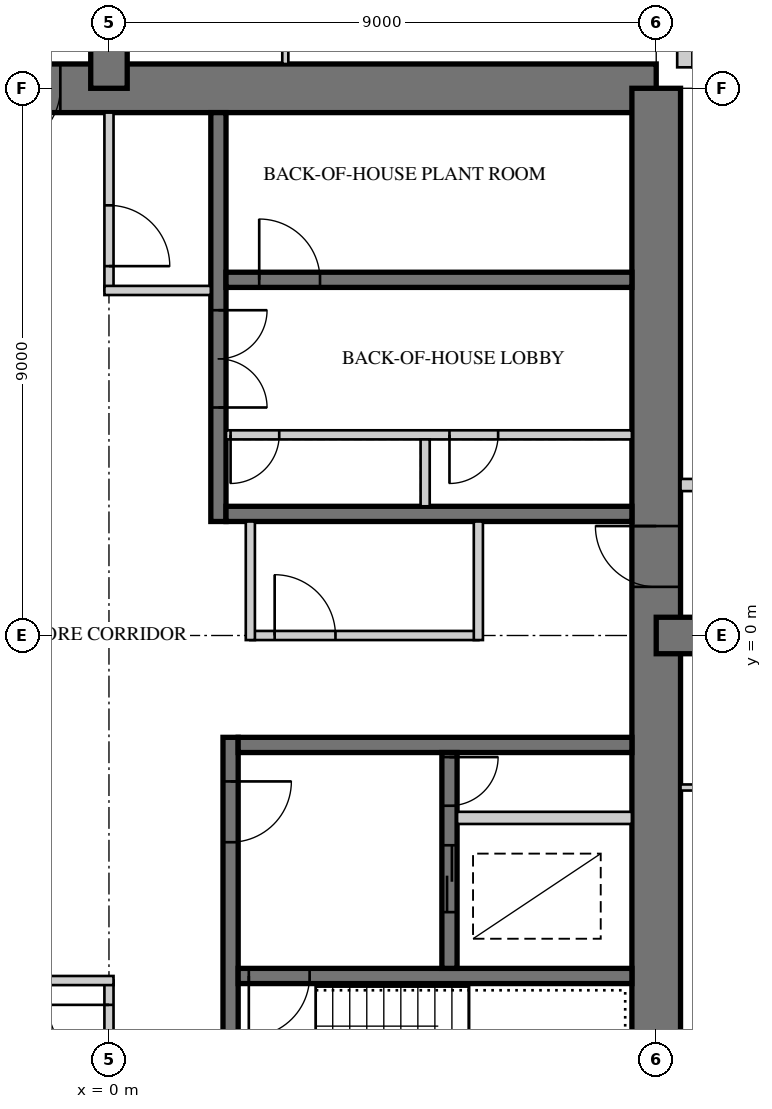
"""IFC4 building model, lengths in metres.
Left out: names, types, materials, properties, quantities, classifications, styles, units other than length and angle.
Written with IfcOpenShell. Run it as: python <this file> out.ifc"""

import sys

from ifc_helpers import new_model, si_unit, direction, frame, frame_2d, origin, place, context, subcontext, project, spatial, rectangle, extrude, element, fill, save


model = new_model("IFC4")
c1 = context("Model", 3, precision=1e-05, world=origin(), true_north=direction((0.0, 1.0)))
c2 = subcontext(c1, "Body", "Model", "MODEL_VIEW")
j1 = project(units=[si_unit("LENGTHUNIT", "METRE"), si_unit("PLANEANGLEUNIT", "RADIAN")], contexts=[c1])
p1 = place(None, origin())
s1 = spatial("IfcSite", under=j1, at=p1, CompositionType="ELEMENT")
p2 = place(p1, origin())
s2 = spatial("IfcBuilding", under=s1, at=p2, CompositionType="ELEMENT")
p3 = place(p2, frame((0.0, 0.0, 267.9)))
s3 = spatial("IfcBuildingStorey", under=s2, at=p3, CompositionType="ELEMENT", Elevation=267.9)
p4 = place(p3, frame((9.0, 9.0, 0.0), z_axis=(0.0, 0.0, 1.0), x_axis=(-1.0, 0.0, 0.0)))
e1 = element("IfcWall", 1, at=p4, inside=s3, PredefinedType="SHEAR", context=c2, shape_type="SweptSolid", body=[
    extrude(rectangle(XDim=18.0, YDim=0.8, at=frame_2d((9.0, 0.0))), origin(), (0.0, 0.0, 1.0), 3.4),
])
p5 = place(p4, frame((9.8, 0.0, 0.0)))
e2 = element("IfcOpeningElement", 2, at=p5, cuts=e1, PredefinedType="OPENING", context=c2, shape_type="SweptSolid", body=[
    extrude(rectangle(XDim=1.0, YDim=2.4, at=frame_2d((0.5, 1.2))), frame((0.0, 0.41, 0.0), z_axis=(0.0, -1.0, 0.0), x_axis=(1.0, 0.0, 0.0)), (0.0, 0.0, 1.0), 0.82),
])
p6 = place(p3, frame((9.0, -9.0, 0.0), z_axis=(0.0, 0.0, 1.0), x_axis=(0.0, 1.0, 0.0)))
e3 = element("IfcWall", 3, at=p6, inside=s3, PredefinedType="SHEAR", context=c2, shape_type="SweptSolid", body=[
    extrude(rectangle(XDim=18.0, YDim=0.8, at=frame_2d((9.0, 0.0))), origin(), (0.0, 0.0, 1.0), 3.4),
])
p7 = place(p6, frame((9.8, 0.0, 0.0)))
e4 = element("IfcOpeningElement", 4, at=p7, cuts=e3, PredefinedType="OPENING", context=c2, shape_type="SweptSolid", body=[
    extrude(rectangle(XDim=1.0, YDim=2.4, at=frame_2d((0.5, 1.2))), frame((0.0, 0.41, 0.0), z_axis=(0.0, -1.0, 0.0), x_axis=(1.0, 0.0, 0.0)), (0.0, 0.0, 1.0), 0.82),
])
p8 = place(p3, frame((1.8, 1.875, 0.0), z_axis=(0.0, 0.0, 1.0), x_axis=(0.0, 1.0, 0.0)))
e5 = element("IfcWall", 5, at=p8, inside=s3, PredefinedType="SHEAR", context=c2, shape_type="SweptSolid", body=[
    extrude(rectangle(XDim=6.725, YDim=0.25, at=frame_2d((3.363, 0.0))), origin(), (0.0, 0.0, 1.0), 3.4),
])
p9 = place(p8, frame((1.875, 0.0, 0.0)))
e6 = element("IfcOpeningElement", 6, at=p9, cuts=e5, PredefinedType="OPENING", context=c2, shape_type="SweptSolid", body=[
    extrude(rectangle(XDim=1.6, YDim=2.4, at=frame_2d((0.8, 1.2))), frame((0.0, 0.135, 0.0), z_axis=(0.0, -1.0, 0.0), x_axis=(1.0, 0.0, 0.0)), (0.0, 0.0, 1.0), 0.27),
])
p10 = place(p3, frame((1.925, 2.0, 0.0), z_axis=(0.0, 0.0, 1.0), x_axis=(1.0, 0.0, 0.0)))
e7 = element("IfcWall", 7, at=p10, inside=s3, PredefinedType="SHEAR", context=c2, shape_type="SweptSolid", body=[
    extrude(rectangle(XDim=6.675, YDim=0.25, at=frame_2d((3.337, 0.0))), origin(), (0.0, 0.0, 1.0), 3.4),
])
p11 = place(p3, frame((1.925, 5.85, 0.0), z_axis=(0.0, 0.0, 1.0), x_axis=(1.0, 0.0, 0.0)))
e8 = element("IfcWall", 8, at=p11, inside=s3, PredefinedType="SHEAR", context=c2, shape_type="SweptSolid", body=[
    extrude(rectangle(XDim=6.675, YDim=0.25, at=frame_2d((3.337, 0.0))), origin(), (0.0, 0.0, 1.0), 3.4),
])
p12 = place(p11, frame((0.546, 0.0, 0.0)))
e9 = element("IfcOpeningElement", 9, at=p12, cuts=e8, PredefinedType="OPENING", context=c2, shape_type="SweptSolid", body=[
    extrude(rectangle(XDim=1.0, YDim=2.1, at=frame_2d((0.5, 1.05))), frame((0.0, 0.135, 0.0), z_axis=(0.0, -1.0, 0.0), x_axis=(1.0, 0.0, 0.0)), (0.0, 0.0, 1.0), 0.27),
])
p13 = place(p3, frame((1.925, 3.3, 0.0), z_axis=(0.0, 0.0, 1.0), x_axis=(1.0, 0.0, 0.0)))
e10 = element("IfcWall", 10, at=p13, inside=s3, PredefinedType="PARTITIONING", context=c2, shape_type="SweptSolid", body=[
    extrude(rectangle(XDim=6.675, YDim=0.15, at=frame_2d((3.337, 0.0))), origin(), (0.0, 0.0, 1.0), 3.4),
])
p14 = place(p13, frame((0.075, 0.0, 0.0)))
e11 = element("IfcOpeningElement", 11, at=p14, cuts=e10, PredefinedType="OPENING", context=c2, shape_type="SweptSolid", body=[
    extrude(rectangle(XDim=0.8, YDim=2.1, at=frame_2d((0.4, 1.05))), frame((0.0, 0.085, 0.0), z_axis=(0.0, -1.0, 0.0), x_axis=(1.0, 0.0, 0.0)), (0.0, 0.0, 1.0), 0.17),
])
p15 = place(p13, frame((3.675, 0.0, 0.0)))
e12 = element("IfcOpeningElement", 12, at=p15, cuts=e10, PredefinedType="OPENING", context=c2, shape_type="SweptSolid", body=[
    extrude(rectangle(XDim=0.8, YDim=2.1, at=frame_2d((0.4, 1.05))), frame((0.0, 0.085, 0.0), z_axis=(0.0, -1.0, 0.0), x_axis=(1.0, 0.0, 0.0)), (0.0, 0.0, 1.0), 0.17),
])
p16 = place(p3, frame((5.2, 2.125, 0.0), z_axis=(0.0, 0.0, 1.0), x_axis=(0.0, 1.0, 0.0)))
e13 = element("IfcWall", 13, at=p16, inside=s3, PredefinedType="PARTITIONING", context=c2, shape_type="SweptSolid", body=[
    extrude(rectangle(XDim=1.1, YDim=0.15, at=frame_2d((0.55, 0.0))), origin(), (0.0, 0.0, 1.0), 3.4),
])
p17 = place(p3, frame((2.0, -1.675, 0.0), z_axis=(0.0, 0.0, 1.0), x_axis=(0.0, -1.0, 0.0)))
e14 = element("IfcWall", 14, at=p17, inside=s3, PredefinedType="SHEAR", context=c2, shape_type="SweptSolid", body=[
    extrude(rectangle(XDim=6.925, YDim=0.25, at=frame_2d((3.462, 0.0))), origin(), (0.0, 0.0, 1.0), 3.4),
])
p18 = place(p17, frame((0.725, 0.0, 0.0)))
e15 = element("IfcOpeningElement", 15, at=p18, cuts=e14, PredefinedType="OPENING", context=c2, shape_type="SweptSolid", body=[
    extrude(rectangle(XDim=1.0, YDim=2.1, at=frame_2d((0.5, 1.05))), frame((0.0, 0.135, 0.0), z_axis=(0.0, -1.0, 0.0), x_axis=(1.0, 0.0, 0.0)), (0.0, 0.0, 1.0), 0.27),
])
p19 = place(p3, frame((2.125, -1.8, 0.0), z_axis=(0.0, 0.0, 1.0), x_axis=(1.0, 0.0, 0.0)))
e16 = element("IfcWall", 16, at=p19, inside=s3, PredefinedType="SHEAR", context=c2, shape_type="SweptSolid", body=[
    extrude(rectangle(XDim=6.475, YDim=0.25, at=frame_2d((3.238, 0.0))), origin(), (0.0, 0.0, 1.0), 3.4),
])
p20 = place(p3, frame((2.125, -5.6, 0.0), z_axis=(0.0, 0.0, 1.0), x_axis=(1.0, 0.0, 0.0)))
e17 = element("IfcWall", 17, at=p20, inside=s3, PredefinedType="SHEAR", context=c2, shape_type="SweptSolid", body=[
    extrude(rectangle(XDim=6.475, YDim=0.25, at=frame_2d((3.238, 0.0))), origin(), (0.0, 0.0, 1.0), 3.4),
])
p21 = place(p20, frame((0.175, 0.0, 0.0)))
e18 = element("IfcOpeningElement", 18, at=p21, cuts=e17, PredefinedType="OPENING", context=c2, shape_type="SweptSolid", body=[
    extrude(rectangle(XDim=1.0, YDim=2.1, at=frame_2d((0.5, 1.05))), frame((0.0, 0.135, 0.0), z_axis=(0.0, -1.0, 0.0), x_axis=(1.0, 0.0, 0.0)), (0.0, 0.0, 1.0), 0.27),
])
p22 = place(p3, frame((5.6, -1.925, 0.0), z_axis=(0.0, 0.0, 1.0), x_axis=(0.0, -1.0, 0.0)))
e19 = element("IfcWall", 19, at=p22, inside=s3, PredefinedType="SHEAR", context=c2, shape_type="SweptSolid", body=[
    extrude(rectangle(XDim=3.55, YDim=0.25, at=frame_2d((1.775, 0.0))), origin(), (0.0, 0.0, 1.0), 3.4),
])
p23 = place(p22, frame((1.525, 0.0, 0.0)))
e20 = element("IfcOpeningElement", 20, at=p23, cuts=e19, PredefinedType="OPENING", context=c2, shape_type="SweptSolid", body=[
    extrude(rectangle(XDim=1.1, YDim=2.2, at=frame_2d((0.55, 1.1))), frame((0.0, 0.135, 0.0), z_axis=(0.0, -1.0, 0.0), x_axis=(1.0, 0.0, 0.0)), (0.0, 0.0, 1.0), 0.27),
])
p24 = place(p22, frame((0.075, 0.0, 0.0)))
e21 = element("IfcOpeningElement", 21, at=p24, cuts=e19, PredefinedType="OPENING", context=c2, shape_type="SweptSolid", body=[
    extrude(rectangle(XDim=0.8, YDim=2.1, at=frame_2d((0.4, 1.05))), frame((0.0, 0.135, 0.0), z_axis=(0.0, -1.0, 0.0), x_axis=(1.0, 0.0, 0.0)), (0.0, 0.0, 1.0), 0.27),
])
p25 = place(p3, frame((5.725, -3.0, 0.0), z_axis=(0.0, 0.0, 1.0), x_axis=(1.0, 0.0, 0.0)))
e22 = element("IfcWall", 22, at=p25, inside=s3, PredefinedType="PARTITIONING", context=c2, shape_type="SweptSolid", body=[
    extrude(rectangle(XDim=2.875, YDim=0.2, at=frame_2d((1.438, 0.0))), origin(), (0.0, 0.0, 1.0), 3.4),
])
p26 = place(p3, frame((0.0, 9.0, 0.0), z_axis=(0.0, 0.0, 1.0), x_axis=(0.0, 1.0, 0.0)))
e23 = element("IfcWall", 23, at=p26, inside=s3, PredefinedType="SHEAR", context=c2, shape_type="SweptSolid", body=[
    extrude(rectangle(XDim=9.0, YDim=0.6, at=frame_2d((4.5, 0.0))), origin(), (0.0, 0.0, 1.0), 3.4),
])
p27 = place(p26, frame((3.8, 0.0, 0.0)))
e24 = element("IfcOpeningElement", 24, at=p27, cuts=e23, PredefinedType="OPENING", context=c2, shape_type="SweptSolid", body=[
    extrude(rectangle(XDim=1.0, YDim=2.15, at=frame_2d((0.5, 1.075))), frame((0.0, 0.31, 0.0), z_axis=(0.0, -1.0, 0.0), x_axis=(1.0, 0.0, 0.0)), (0.0, 0.0, 1.0), 0.62),
])
p28 = place(p26, frame((7.0, 0.0, 0.0)))
e25 = element("IfcOpeningElement", 25, at=p28, cuts=e23, PredefinedType="OPENING", context=c2, shape_type="SweptSolid", body=[
    extrude(rectangle(XDim=1.0, YDim=2.2, at=frame_2d((0.5, 1.1))), frame((0.0, 0.31, 0.0), z_axis=(0.0, -1.0, 0.0), x_axis=(1.0, 0.0, 0.0)), (0.0, 0.0, 1.0), 0.62),
])
p29 = place(p3, frame((9.0, 0.0, 0.0), z_axis=(0.0, 0.0, 1.0), x_axis=(1.0, 0.0, 0.0)))
e26 = element("IfcWall", 26, at=p29, inside=s3, PredefinedType="SHEAR", context=c2, shape_type="SweptSolid", body=[
    extrude(rectangle(XDim=9.0, YDim=0.6, at=frame_2d((4.5, 0.0))), origin(), (0.0, 0.0, 1.0), 3.4),
])
p30 = place(p29, frame((3.8, 0.0, 0.0)))
e27 = element("IfcOpeningElement", 27, at=p30, cuts=e26, PredefinedType="OPENING", context=c2, shape_type="SweptSolid", body=[
    extrude(rectangle(XDim=1.0, YDim=2.15, at=frame_2d((0.5, 1.075))), frame((0.0, 0.31, 0.0), z_axis=(0.0, -1.0, 0.0), x_axis=(1.0, 0.0, 0.0)), (0.0, 0.0, 1.0), 0.62),
])
p31 = place(p29, frame((7.0, 0.0, 0.0)))
e28 = element("IfcOpeningElement", 28, at=p31, cuts=e26, PredefinedType="OPENING", context=c2, shape_type="SweptSolid", body=[
    extrude(rectangle(XDim=1.0, YDim=2.2, at=frame_2d((0.5, 1.1))), frame((0.0, 0.31, 0.0), z_axis=(0.0, -1.0, 0.0), x_axis=(1.0, 0.0, 0.0)), (0.0, 0.0, 1.0), 0.62),
])
p32 = place(p3, frame((12.47, 9.47, 0.0), z_axis=(0.0, 0.0, 1.0), x_axis=(-1.0, 0.0, 0.0)))
e29 = element("IfcWall", 29, at=p32, inside=s3, PredefinedType="SOLIDWALL", context=c2, shape_type="SweptSolid", body=[
    extrude(rectangle(XDim=2.875, YDim=0.25, at=frame_2d((1.438, 0.0))), origin(), (0.0, 0.0, 1.0), 3.22),
])
p33 = place(p32, frame((0.6, 0.0, 0.0)))
e30 = element("IfcOpeningElement", 30, at=p33, cuts=e29, PredefinedType="OPENING", context=c2, shape_type="SweptSolid", body=[
    extrude(rectangle(XDim=1.0, YDim=2.2, at=frame_2d((0.5, 1.1))), frame((0.0, 0.135, 0.0), z_axis=(0.0, -1.0, 0.0), x_axis=(1.0, 0.0, 0.0)), (0.0, 0.0, 1.0), 0.27),
])
p34 = place(p3, frame((9.47, 9.345, 0.0), z_axis=(0.0, 0.0, 1.0), x_axis=(0.0, 1.0, 0.0)))
e31 = element("IfcWall", 31, at=p34, inside=s3, PredefinedType="SOLIDWALL", context=c2, shape_type="SweptSolid", body=[
    extrude(rectangle(XDim=3.125, YDim=0.25, at=frame_2d((1.562, 0.0))), origin(), (0.0, 0.0, 1.0), 3.22),
])
p35 = place(p34, frame((0.6, 0.0, 0.0)))
e32 = element("IfcOpeningElement", 32, at=p35, cuts=e31, PredefinedType="OPENING", context=c2, shape_type="SweptSolid", body=[
    extrude(rectangle(XDim=1.0, YDim=2.2, at=frame_2d((0.5, 1.1))), frame((0.0, 0.135, 0.0), z_axis=(0.0, -1.0, 0.0), x_axis=(1.0, 0.0, 0.0)), (0.0, 0.0, 1.0), 0.27),
])
p36 = place(p3, frame((2.325, 0.0, 0.0), z_axis=(0.0, 0.0, 1.0), x_axis=(1.0, 0.0, 0.0)))
e33 = element("IfcWall", 33, at=p36, inside=s3, PredefinedType="PARTITIONING", context=c2, shape_type="SweptSolid", body=[
    extrude(rectangle(XDim=3.75, YDim=0.15, at=frame_2d((1.875, 0.0))), origin(), (0.0, 0.0, 1.0), 3.22),
])
p37 = place(p36, frame((0.4, 0.0, 0.0)))
e34 = element("IfcOpeningElement", 34, at=p37, cuts=e33, PredefinedType="OPENING", context=c2, shape_type="SweptSolid", body=[
    extrude(rectangle(XDim=1.0, YDim=2.1, at=frame_2d((0.5, 1.05))), frame((0.0, 0.085, 0.0), z_axis=(0.0, -1.0, 0.0), x_axis=(1.0, 0.0, 0.0)), (0.0, 0.0, 1.0), 0.17),
])
for number, where, z_axis, x_axis in (
    (35, (2.325, 1.875, 0.0), (0.0, 0.0, 1.0), (0.0, -1.0, 0.0)),
    (36, (6.075, -0.075, 0.0), (0.0, 0.0, 1.0), (0.0, 1.0, 0.0)),
):
    element("IfcWall", number, at=place(p3, frame(where, z_axis=z_axis, x_axis=x_axis)), inside=s3, PredefinedType="PARTITIONING", context=c2, shape_type="SweptSolid", body=[
        extrude(rectangle(XDim=1.95, YDim=0.15, at=frame_2d((0.975, 0.0))), origin(), (0.0, 0.0, 1.0), 3.22),
    ])
p38 = place(p3, frame((0.0, 5.675, 0.0), z_axis=(0.0, 0.0, 1.0), x_axis=(0.0, 1.0, 0.0)))
e37 = element("IfcWall", 37, at=p38, inside=s3, PredefinedType="PARTITIONING", context=c2, shape_type="SweptSolid", body=[
    extrude(rectangle(XDim=2.925, YDim=0.15, at=frame_2d((1.462, 0.0))), origin(), (0.0, 0.0, 1.0), 3.22),
])
p39 = place(p38, frame((0.4, 0.0, 0.0)))
e38 = element("IfcOpeningElement", 38, at=p39, cuts=e37, PredefinedType="OPENING", context=c2, shape_type="SweptSolid", body=[
    extrude(rectangle(XDim=1.0, YDim=2.1, at=frame_2d((0.5, 1.05))), frame((0.0, 0.085, 0.0), z_axis=(0.0, -1.0, 0.0), x_axis=(1.0, 0.0, 0.0)), (0.0, 0.0, 1.0), 0.17),
])
p40 = place(p3, frame((1.675, 5.675, 0.0), z_axis=(0.0, 0.0, 1.0), x_axis=(-1.0, 0.0, 0.0)))
e39 = element("IfcWall", 39, at=p40, inside=s3, PredefinedType="PARTITIONING", context=c2, shape_type="SweptSolid", body=[
    extrude(rectangle(XDim=1.75, YDim=0.15, at=frame_2d((0.875, 0.0))), origin(), (0.0, 0.0, 1.0), 3.22),
])
p41 = place(p3, frame((0.0, -5.675, 0.0), z_axis=(0.0, 0.0, 1.0), x_axis=(0.0, -1.0, 0.0)))
e40 = element("IfcWall", 40, at=p41, inside=s3, PredefinedType="PARTITIONING", context=c2, shape_type="SweptSolid", body=[
    extrude(rectangle(XDim=2.925, YDim=0.15, at=frame_2d((1.462, 0.0))), origin(), (0.0, 0.0, 1.0), 3.22),
])
p42 = place(p41, frame((0.4, 0.0, 0.0)))
e41 = element("IfcOpeningElement", 41, at=p42, cuts=e40, PredefinedType="OPENING", context=c2, shape_type="SweptSolid", body=[
    extrude(rectangle(XDim=1.0, YDim=2.1, at=frame_2d((0.5, 1.05))), frame((0.0, 0.085, 0.0), z_axis=(0.0, -1.0, 0.0), x_axis=(1.0, 0.0, 0.0)), (0.0, 0.0, 1.0), 0.17),
])
p43 = place(p3, frame((-1.675, -5.675, 0.0), z_axis=(0.0, 0.0, 1.0), x_axis=(1.0, 0.0, 0.0)))
e42 = element("IfcWall", 42, at=p43, inside=s3, PredefinedType="PARTITIONING", context=c2, shape_type="SweptSolid", body=[
    extrude(rectangle(XDim=1.75, YDim=0.15, at=frame_2d((0.875, 0.0))), origin(), (0.0, 0.0, 1.0), 3.22),
])
p44 = place(p3, frame((2.9, 9.4, 0.0), z_axis=(0.0, 0.0, 1.0), x_axis=(0.0, 1.0, 0.0)))
e43 = element("IfcWall", 43, at=p44, inside=s3, PredefinedType="PARTITIONING", context=c2, shape_type="SweptSolid", body=[
    extrude(rectangle(XDim=2.85, YDim=0.1, at=frame_2d((1.425, 0.0))), origin(), (0.0, 0.0, 1.0), 3.22),
])
p45 = place(p3, frame((9.4, -2.5, 0.0), z_axis=(0.0, 0.0, 1.0), x_axis=(1.0, 0.0, 0.0)))
e44 = element("IfcWall", 44, at=p45, inside=s3, PredefinedType="PARTITIONING", context=c2, shape_type="SweptSolid", body=[
    extrude(rectangle(XDim=2.65, YDim=0.1, at=frame_2d((1.325, 0.0))), origin(), (0.0, 0.0, 1.0), 3.22),
])
p46 = place(p3, frame((9.4, 2.475, 0.0), z_axis=(0.0, 0.0, 1.0), x_axis=(1.0, 0.0, 0.0)))
e45 = element("IfcWall", 45, at=p46, inside=s3, PredefinedType="SOLIDWALL", context=c2, shape_type="SweptSolid", body=[
    extrude(rectangle(XDim=5.6, YDim=0.2, at=frame_2d((2.8, 0.0))), origin(), (0.0, 0.0, 1.0), 3.22),
])
p47 = place(p46, frame((1.2, 0.0, 0.0)))
e46 = element("IfcOpeningElement", 46, at=p47, cuts=e45, PredefinedType="OPENING", context=c2, shape_type="SweptSolid", body=[
    extrude(rectangle(XDim=1.0, YDim=2.2, at=frame_2d((0.5, 1.1))), frame((0.0, 0.11, 0.0), z_axis=(0.0, -1.0, 0.0), x_axis=(1.0, 0.0, 0.0)), (0.0, 0.0, 1.0), 0.22),
])
p48 = place(p37, origin())
e47 = element("IfcDoor", 47, at=p48, inside=s3, OperationType="SINGLE_SWING_LEFT", PredefinedType="DOOR", context=c2, shape_type="SweptSolid", body=[
    extrude(rectangle(XDim=1.0, YDim=2.1, at=frame_2d((0.5, 1.05))), frame((0.0, 0.025, 0.0), z_axis=(0.0, -1.0, 0.0), x_axis=(1.0, 0.0, 0.0)), (0.0, 0.0, 1.0), 0.05),
])
fill(e34, e47)
p49 = place(p39, frame((1.0, 0.0, 0.0), z_axis=(0.0, 0.0, 1.0), x_axis=(-1.0, 0.0, 0.0)))
e48 = element("IfcDoor", 48, at=p49, inside=s3, OperationType="SINGLE_SWING_RIGHT", PredefinedType="DOOR", context=c2, shape_type="SweptSolid", body=[
    extrude(rectangle(XDim=1.0, YDim=2.1, at=frame_2d((0.5, 1.05))), frame((0.0, 0.025, 0.0), z_axis=(0.0, -1.0, 0.0), x_axis=(1.0, 0.0, 0.0)), (0.0, 0.0, 1.0), 0.05),
])
fill(e38, e48)
p50 = place(p42, frame((1.0, 0.0, 0.0), z_axis=(0.0, 0.0, 1.0), x_axis=(-1.0, 0.0, 0.0)))
e49 = element("IfcDoor", 49, at=p50, inside=s3, OperationType="SINGLE_SWING_RIGHT", PredefinedType="DOOR", context=c2, shape_type="SweptSolid", body=[
    extrude(rectangle(XDim=1.0, YDim=2.1, at=frame_2d((0.5, 1.05))), frame((0.0, 0.025, 0.0), z_axis=(0.0, -1.0, 0.0), x_axis=(1.0, 0.0, 0.0)), (0.0, 0.0, 1.0), 0.05),
])
fill(e41, e49)
p51 = place(p5, origin())
e50 = element("IfcDoor", 50, at=p51, inside=s3, OperationType="SINGLE_SWING_RIGHT", PredefinedType="DOOR", context=c2, shape_type="SweptSolid", body=[
    extrude(rectangle(XDim=1.0, YDim=2.4, at=frame_2d((0.5, 1.2))), frame((0.0, 0.055, 0.0), z_axis=(0.0, -1.0, 0.0), x_axis=(1.0, 0.0, 0.0)), (0.0, 0.0, 1.0), 0.05),
])
fill(e2, e50)
p52 = place(p7, origin())
e51 = element("IfcDoor", 51, at=p52, inside=s3, OperationType="SINGLE_SWING_RIGHT", PredefinedType="DOOR", context=c2, shape_type="SweptSolid", body=[
    extrude(rectangle(XDim=1.0, YDim=2.4, at=frame_2d((0.5, 1.2))), frame((0.0, 0.055, 0.0), z_axis=(0.0, -1.0, 0.0), x_axis=(1.0, 0.0, 0.0)), (0.0, 0.0, 1.0), 0.05),
])
fill(e4, e51)
p53 = place(p9, frame((1.6, 0.0, 0.0), z_axis=(0.0, 0.0, 1.0), x_axis=(-1.0, 0.0, 0.0)))
e52 = element("IfcDoor", 52, at=p53, inside=s3, OperationType="DOUBLE_DOOR_SINGLE_SWING", PredefinedType="DOOR", context=c2, shape_type="SweptSolid", body=[
    extrude(rectangle(XDim=1.6, YDim=2.4, at=frame_2d((0.8, 1.2))), frame((0.0, 0.025, 0.0), z_axis=(0.0, -1.0, 0.0), x_axis=(1.0, 0.0, 0.0)), (0.0, 0.0, 1.0), 0.05),
])
fill(e6, e52)
p54 = place(p14, frame((0.8, 0.0, 0.0), z_axis=(0.0, 0.0, 1.0), x_axis=(-1.0, 0.0, 0.0)))
e53 = element("IfcDoor", 53, at=p54, inside=s3, OperationType="SINGLE_SWING_RIGHT", PredefinedType="DOOR", context=c2, shape_type="SweptSolid", body=[
    extrude(rectangle(XDim=0.8, YDim=2.1, at=frame_2d((0.4, 1.05))), frame((0.0, 0.025, 0.0), z_axis=(0.0, -1.0, 0.0), x_axis=(1.0, 0.0, 0.0)), (0.0, 0.0, 1.0), 0.05),
])
fill(e11, e53)
p55 = place(p15, frame((0.8, 0.0, 0.0), z_axis=(0.0, 0.0, 1.0), x_axis=(-1.0, 0.0, 0.0)))
e54 = element("IfcDoor", 54, at=p55, inside=s3, OperationType="SINGLE_SWING_RIGHT", PredefinedType="DOOR", context=c2, shape_type="SweptSolid", body=[
    extrude(rectangle(XDim=0.8, YDim=2.1, at=frame_2d((0.4, 1.05))), frame((0.0, 0.025, 0.0), z_axis=(0.0, -1.0, 0.0), x_axis=(1.0, 0.0, 0.0)), (0.0, 0.0, 1.0), 0.05),
])
fill(e12, e54)
p56 = place(p18, origin())
e55 = element("IfcDoor", 55, at=p56, inside=s3, OperationType="SINGLE_SWING_LEFT", PredefinedType="DOOR", context=c2, shape_type="SweptSolid", body=[
    extrude(rectangle(XDim=1.0, YDim=2.1, at=frame_2d((0.5, 1.05))), frame((0.0, 0.025, 0.0), z_axis=(0.0, -1.0, 0.0), x_axis=(1.0, 0.0, 0.0)), (0.0, 0.0, 1.0), 0.05),
])
fill(e15, e55)
p57 = place(p21, frame((1.0, 0.0, 0.0), z_axis=(0.0, 0.0, 1.0), x_axis=(-1.0, 0.0, 0.0)))
e56 = element("IfcDoor", 56, at=p57, inside=s3, OperationType="SINGLE_SWING_RIGHT", PredefinedType="DOOR", context=c2, shape_type="SweptSolid", body=[
    extrude(rectangle(XDim=1.0, YDim=2.1, at=frame_2d((0.5, 1.05))), frame((0.0, 0.025, 0.0), z_axis=(0.0, -1.0, 0.0), x_axis=(1.0, 0.0, 0.0)), (0.0, 0.0, 1.0), 0.05),
])
fill(e18, e56)
p58 = place(p23, origin())
e57 = element("IfcDoor", 57, at=p58, inside=s3, OperationType="DOUBLE_DOOR_SLIDING", PredefinedType="DOOR", context=c2, shape_type="SweptSolid", body=[
    extrude(rectangle(XDim=1.1, YDim=2.2, at=frame_2d((0.55, 1.1))), frame((0.0, 0.025, 0.0), z_axis=(0.0, -1.0, 0.0), x_axis=(1.0, 0.0, 0.0)), (0.0, 0.0, 1.0), 0.05),
])
fill(e20, e57)
p59 = place(p24, origin())
e58 = element("IfcDoor", 58, at=p59, inside=s3, OperationType="SINGLE_SWING_LEFT", PredefinedType="DOOR", context=c2, shape_type="SweptSolid", body=[
    extrude(rectangle(XDim=0.8, YDim=2.1, at=frame_2d((0.4, 1.05))), frame((0.0, 0.025, 0.0), z_axis=(0.0, -1.0, 0.0), x_axis=(1.0, 0.0, 0.0)), (0.0, 0.0, 1.0), 0.05),
])
fill(e21, e58)
p60 = place(p12, origin())
e59 = element("IfcDoor", 59, at=p60, inside=s3, OperationType="SINGLE_SWING_LEFT", PredefinedType="DOOR", context=c2, shape_type="SweptSolid", body=[
    extrude(rectangle(XDim=1.0, YDim=2.1, at=frame_2d((0.5, 1.05))), frame((0.0, 0.025, 0.0), z_axis=(0.0, -1.0, 0.0), x_axis=(1.0, 0.0, 0.0)), (0.0, 0.0, 1.0), 0.05),
])
fill(e9, e59)
save(model, sys.argv[1])
